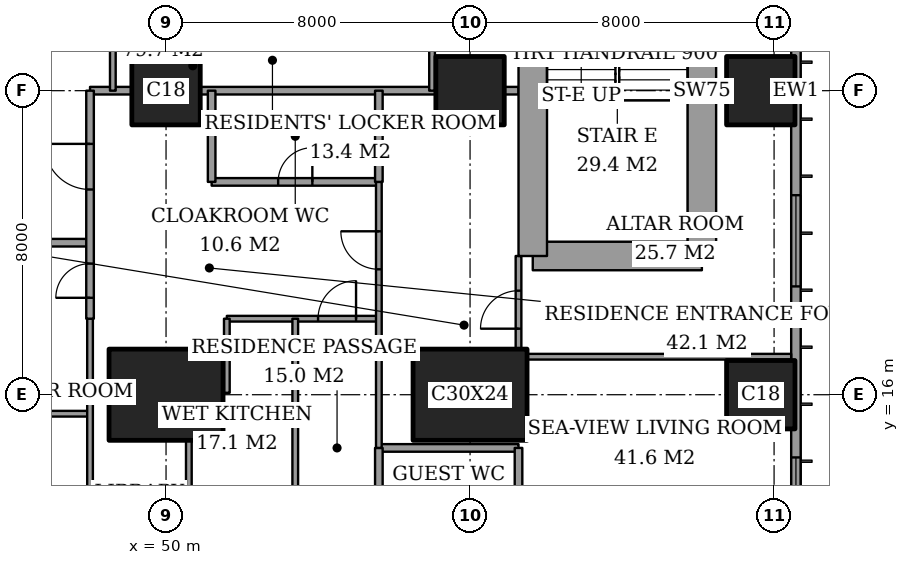
"""IFC4 building model, lengths in metres.
Left out: names, types, materials, properties, quantities, classifications, styles, units other than length and angle.
Written with IfcOpenShell. Run it as: python <this file> out.ifc"""

import sys

from ifc_helpers import new_model, si_unit, direction, frame, frame_2d, origin, origin_2d, place, context, subcontext, project, spatial, rectangle, extrude, element, fill, save


model = new_model("IFC4")
c1 = context("Model", 3, precision=1e-05, world=origin(), true_north=direction((0.0, 1.0)))
c2 = subcontext(c1, "Body", "Model", "MODEL_VIEW")
j1 = project(units=[si_unit("LENGTHUNIT", "METRE"), si_unit("PLANEANGLEUNIT", "RADIAN")], contexts=[c1])
p1 = place(None, origin())
s1 = spatial("IfcSite", under=j1, at=p1, CompositionType="ELEMENT")
p2 = place(p1, origin())
s2 = spatial("IfcBuilding", under=s1, at=p2, CompositionType="ELEMENT")
p3 = place(p2, frame((0.0, 0.0, 207.4)))
s3 = spatial("IfcBuildingStorey", under=s2, at=p3, CompositionType="ELEMENT", Elevation=207.4)
p4 = place(p3, frame((50.0, 16.0, 0.0), z_axis=(0.0, 0.0, 1.0), x_axis=(1.0, 0.0, 0.0)))
e1 = element("IfcColumn", 1, at=p4, inside=s3, PredefinedType="COLUMN", context=c2, shape_type="SweptSolid", body=[
    extrude(rectangle(XDim=3.0, YDim=2.4, at=origin_2d()), origin(), (0.0, 0.0, 1.0), 3.6),
])
p5 = place(p3, frame((50.0, 24.0, 0.0), z_axis=(0.0, 0.0, 1.0), x_axis=(1.0, 0.0, 0.0)))
e2 = element("IfcColumn", 2, at=p5, inside=s3, PredefinedType="COLUMN", context=c2, shape_type="SweptSolid", body=[
    extrude(rectangle(XDim=1.8, YDim=1.8, at=origin_2d()), origin(), (0.0, 0.0, 1.0), 3.6),
])
p6 = place(p3, frame((58.0, 16.0, 0.0), z_axis=(0.0, 0.0, 1.0), x_axis=(1.0, 0.0, 0.0)))
e3 = element("IfcColumn", 3, at=p6, inside=s3, PredefinedType="COLUMN", context=c2, shape_type="SweptSolid", body=[
    extrude(rectangle(XDim=3.0, YDim=2.4, at=origin_2d()), origin(), (0.0, 0.0, 1.0), 3.6),
])
for number, where, z_axis, x_axis in (
    (4, (58.0, 24.0, 0.0), (0.0, 0.0, 1.0), (1.0, 0.0, 0.0)),
    (5, (65.65, 16.0, 0.0), (0.0, 0.0, 1.0), (1.0, 0.0, 0.0)),
    (6, (65.65, 24.0, 0.0), (0.0, 0.0, 1.0), (1.0, 0.0, 0.0)),
):
    element("IfcColumn", number, at=place(p3, frame(where, z_axis=z_axis, x_axis=x_axis)), inside=s3, PredefinedType="COLUMN", context=c2, shape_type="SweptSolid", body=[
        extrude(rectangle(XDim=1.8, YDim=1.8, at=origin_2d()), origin(), (0.0, 0.0, 1.0), 3.6),
    ])
p7 = place(p3, frame((59.65, 19.65, 0.0), z_axis=(0.0, 0.0, 1.0), x_axis=(1.0, 0.0, 0.0)))
e7 = element("IfcWall", 7, at=p7, inside=s3, PredefinedType="SHEAR", context=c2, shape_type="SweptSolid", body=[
    extrude(rectangle(XDim=4.45, YDim=0.75, at=frame_2d((2.225, 0.0))), origin(), (0.0, 0.0, 1.0), 3.6),
])
p8 = place(p3, frame((64.1, 19.65, 0.0), z_axis=(0.0, 0.0, 1.0), x_axis=(0.0, 1.0, 0.0)))
e8 = element("IfcWall", 8, at=p8, inside=s3, PredefinedType="SHEAR", context=c2, shape_type="SweptSolid", body=[
    extrude(rectangle(XDim=8.7, YDim=0.75, at=frame_2d((4.35, 0.0))), origin(), (0.0, 0.0, 1.0), 3.6),
])
p9 = place(p3, frame((59.65, 28.35, 0.0), z_axis=(0.0, 0.0, 1.0), x_axis=(0.0, -1.0, 0.0)))
e9 = element("IfcWall", 9, at=p9, inside=s3, PredefinedType="SHEAR", context=c2, shape_type="SweptSolid", body=[
    extrude(rectangle(XDim=8.7, YDim=0.75, at=frame_2d((4.35, 0.0))), origin(), (0.0, 0.0, 1.0), 3.6),
])
p10 = place(p9, frame((0.975, 0.0, 0.0)))
e10 = element("IfcOpeningElement", 10, at=p10, cuts=e9, PredefinedType="OPENING", context=c2, shape_type="SweptSolid", body=[
    extrude(rectangle(XDim=1.0, YDim=2.1, at=frame_2d((0.5, 1.05))), frame((0.0, 0.385, 0.0), z_axis=(0.0, -1.0, 0.0), x_axis=(1.0, 0.0, 0.0)), (0.0, 0.0, 1.0), 0.77),
])
p11 = place(p3, frame((66.575, 3.175, 0.0), z_axis=(0.0, 0.0, 1.0), x_axis=(0.0, 1.0, 0.0)))
e11 = element("IfcWall", 11, at=p11, inside=s3, PredefinedType="SOLIDWALL", context=c2, shape_type="SweptSolid", body=[
    extrude(rectangle(XDim=41.65, YDim=0.25, at=frame_2d((20.825, 0.0))), origin(), (0.0, 0.0, 1.0), 3.6),
])
p12 = place(p11, frame((0.825, 0.0, 0.2)))
e12 = element("IfcOpeningElement", 12, at=p12, cuts=e11, PredefinedType="OPENING", context=c2, shape_type="SweptSolid", body=[
    extrude(rectangle(XDim=2.4, YDim=2.4, at=frame_2d((1.2, 1.2))), frame((0.0, 0.135, 0.0), z_axis=(0.0, -1.0, 0.0), x_axis=(1.0, 0.0, 0.0)), (0.0, 0.0, 1.0), 0.27),
])
p13 = place(p11, frame((6.6, 0.0, 0.2)))
e13 = element("IfcOpeningElement", 13, at=p13, cuts=e11, PredefinedType="OPENING", context=c2, shape_type="SweptSolid", body=[
    extrude(rectangle(XDim=1.2, YDim=2.4, at=frame_2d((0.6, 1.2))), frame((0.0, 0.135, 0.0), z_axis=(0.0, -1.0, 0.0), x_axis=(1.0, 0.0, 0.0)), (0.0, 0.0, 1.0), 0.27),
])
p14 = place(p11, frame((8.775, 0.0, 0.2)))
e14 = element("IfcOpeningElement", 14, at=p14, cuts=e11, PredefinedType="OPENING", context=c2, shape_type="SweptSolid", body=[
    extrude(rectangle(XDim=2.4, YDim=2.4, at=frame_2d((1.2, 1.2))), frame((0.0, 0.135, 0.0), z_axis=(0.0, -1.0, 0.0), x_axis=(1.0, 0.0, 0.0)), (0.0, 0.0, 1.0), 0.27),
])
p15 = place(p11, frame((15.675, 0.0, 0.2)))
e15 = element("IfcOpeningElement", 15, at=p15, cuts=e11, PredefinedType="OPENING", context=c2, shape_type="SweptSolid", body=[
    extrude(rectangle(XDim=2.4, YDim=2.4, at=frame_2d((1.2, 1.2))), frame((0.0, 0.135, 0.0), z_axis=(0.0, -1.0, 0.0), x_axis=(1.0, 0.0, 0.0)), (0.0, 0.0, 1.0), 0.27),
])
p16 = place(p11, frame((23.575, 0.0, 0.2)))
e16 = element("IfcOpeningElement", 16, at=p16, cuts=e11, PredefinedType="OPENING", context=c2, shape_type="SweptSolid", body=[
    extrude(rectangle(XDim=2.4, YDim=2.4, at=frame_2d((1.2, 1.2))), frame((0.0, 0.135, 0.0), z_axis=(0.0, -1.0, 0.0), x_axis=(1.0, 0.0, 0.0)), (0.0, 0.0, 1.0), 0.27),
])
p17 = place(p11, frame((30.675, 0.0, 0.2)))
e17 = element("IfcOpeningElement", 17, at=p17, cuts=e11, PredefinedType="OPENING", context=c2, shape_type="SweptSolid", body=[
    extrude(rectangle(XDim=2.4, YDim=2.4, at=frame_2d((1.2, 1.2))), frame((0.0, 0.135, 0.0), z_axis=(0.0, -1.0, 0.0), x_axis=(1.0, 0.0, 0.0)), (0.0, 0.0, 1.0), 0.27),
])
p18 = place(p11, frame((34.325, 0.0, 0.2)))
e18 = element("IfcOpeningElement", 18, at=p18, cuts=e11, PredefinedType="OPENING", context=c2, shape_type="SweptSolid", body=[
    extrude(rectangle(XDim=1.2, YDim=2.4, at=frame_2d((0.6, 1.2))), frame((0.0, 0.135, 0.0), z_axis=(0.0, -1.0, 0.0), x_axis=(1.0, 0.0, 0.0)), (0.0, 0.0, 1.0), 0.27),
])
p19 = place(p11, frame((38.425, 0.0, 0.2)))
e19 = element("IfcOpeningElement", 19, at=p19, cuts=e11, PredefinedType="OPENING", context=c2, shape_type="SweptSolid", body=[
    extrude(rectangle(XDim=2.4, YDim=2.4, at=frame_2d((1.2, 1.2))), frame((0.0, 0.135, 0.0), z_axis=(0.0, -1.0, 0.0), x_axis=(1.0, 0.0, 0.0)), (0.0, 0.0, 1.0), 0.27),
])
p20 = place(p3, frame((55.6, 14.6, 0.0), z_axis=(0.0, 0.0, 1.0), x_axis=(1.0, 0.0, 0.0)))
e20 = element("IfcWall", 20, at=p20, inside=s3, PredefinedType="PARTITIONING", context=c2, shape_type="SweptSolid", body=[
    extrude(rectangle(XDim=3.675, YDim=0.2, at=frame_2d((1.837, 0.0))), origin(), (0.0, 0.0, 1.0), 3.35),
])
p21 = place(p3, frame((42.0, 15.5, 0.0), z_axis=(0.0, 0.0, 1.0), x_axis=(1.0, 0.0, 0.0)))
e21 = element("IfcWall", 21, at=p21, inside=s3, PredefinedType="PARTITIONING", context=c2, shape_type="SweptSolid", body=[
    extrude(rectangle(XDim=6.0, YDim=0.15, at=frame_2d((3.0, 0.0))), origin(), (0.0, 0.0, 1.0), 3.35),
])
p22 = place(p3, frame((48.0, 16.05, 0.0), z_axis=(0.0, 0.0, 1.0), x_axis=(1.0, 0.0, 0.0)))
e22 = element("IfcWall", 22, at=p22, inside=s3, PredefinedType="PARTITIONING", context=c2, shape_type="SweptSolid", body=[
    extrude(rectangle(XDim=0.5, YDim=0.15, at=frame_2d((0.25, 0.0))), origin(), (0.0, 0.0, 1.0), 2.634),
])
p23 = place(p3, frame((59.5, 17.0, 0.0), z_axis=(0.0, 0.0, 1.0), x_axis=(1.0, 0.0, 0.0)))
e23 = element("IfcWall", 23, at=p23, inside=s3, PredefinedType="PARTITIONING", context=c2, shape_type="SweptSolid", body=[
    extrude(rectangle(XDim=6.95, YDim=0.15, at=frame_2d((3.475, 0.0))), origin(), (0.0, 0.0, 1.0), 3.35),
])
p24 = place(p3, frame((51.6, 18.0, 0.0), z_axis=(0.0, 0.0, 1.0), x_axis=(1.0, 0.0, 0.0)))
e24 = element("IfcWall", 24, at=p24, inside=s3, PredefinedType="PARTITIONING", context=c2, shape_type="SweptSolid", body=[
    extrude(rectangle(XDim=4.0, YDim=0.15, at=frame_2d((2.0, 0.0))), origin(), (0.0, 0.0, 1.0), 3.35),
])
p25 = place(p24, frame((2.4, 0.0, 0.0)))
e25 = element("IfcOpeningElement", 25, at=p25, cuts=e24, PredefinedType="OPENING", context=c2, shape_type="SweptSolid", body=[
    extrude(rectangle(XDim=1.0, YDim=2.1, at=frame_2d((0.5, 1.05))), frame((0.0, 0.085, 0.0), z_axis=(0.0, -1.0, 0.0), x_axis=(1.0, 0.0, 0.0)), (0.0, 0.0, 1.0), 0.17),
])
p26 = place(p3, frame((42.0, 20.0, 0.0), z_axis=(0.0, 0.0, 1.0), x_axis=(1.0, 0.0, 0.0)))
e26 = element("IfcWall", 26, at=p26, inside=s3, PredefinedType="PARTITIONING", context=c2, shape_type="SweptSolid", body=[
    extrude(rectangle(XDim=6.0, YDim=0.2, at=frame_2d((3.0, 0.0))), origin(), (0.0, 0.0, 1.0), 3.35),
])
p27 = place(p3, frame((51.2, 21.6, 0.0), z_axis=(0.0, 0.0, 1.0), x_axis=(1.0, 0.0, 0.0)))
e27 = element("IfcWall", 27, at=p27, inside=s3, PredefinedType="PARTITIONING", context=c2, shape_type="SweptSolid", body=[
    extrude(rectangle(XDim=4.4, YDim=0.2, at=frame_2d((2.2, 0.0))), origin(), (0.0, 0.0, 1.0), 3.35),
])
p28 = place(p27, frame((1.75, 0.0, 0.0)))
e28 = element("IfcOpeningElement", 28, at=p28, cuts=e27, PredefinedType="OPENING", context=c2, shape_type="SweptSolid", body=[
    extrude(rectangle(XDim=0.9, YDim=2.1, at=frame_2d((0.45, 1.05))), frame((0.0, 0.11, 0.0), z_axis=(0.0, -1.0, 0.0), x_axis=(1.0, 0.0, 0.0)), (0.0, 0.0, 1.0), 0.22),
])
p29 = place(p3, frame((48.0, 24.0, 0.0), z_axis=(0.0, 0.0, 1.0), x_axis=(1.0, 0.0, 0.0)))
e29 = element("IfcWall", 29, at=p29, inside=s3, PredefinedType="PARTITIONING", context=c2, shape_type="SweptSolid", body=[
    extrude(rectangle(XDim=1.1, YDim=0.2, at=frame_2d((0.55, 0.0))), origin(), (0.0, 0.0, 1.0), 3.35),
])
p30 = place(p3, frame((50.9, 24.0, 0.0), z_axis=(0.0, 0.0, 1.0), x_axis=(1.0, 0.0, 0.0)))
e30 = element("IfcWall", 30, at=p30, inside=s3, PredefinedType="PARTITIONING", context=c2, shape_type="SweptSolid", body=[
    extrude(rectangle(XDim=6.2, YDim=0.2, at=frame_2d((3.1, 0.0))), origin(), (0.0, 0.0, 1.0), 3.35),
])
p31 = place(p3, frame((58.9, 24.0, 0.0), z_axis=(0.0, 0.0, 1.0), x_axis=(1.0, 0.0, 0.0)))
e31 = element("IfcWall", 31, at=p31, inside=s3, PredefinedType="PARTITIONING", context=c2, shape_type="SweptSolid", body=[
    extrude(rectangle(XDim=0.375, YDim=0.2, at=frame_2d((0.188, 0.0))), origin(), (0.0, 0.0, 1.0), 3.35),
])
p32 = place(p3, frame((48.0, 18.0, 0.0), z_axis=(0.0, 0.0, 1.0), x_axis=(0.0, 1.0, 0.0)))
e32 = element("IfcWall", 32, at=p32, inside=s3, PredefinedType="PARTITIONING", context=c2, shape_type="SweptSolid", body=[
    extrude(rectangle(XDim=6.0, YDim=0.2, at=frame_2d((3.0, 0.0))), origin(), (0.0, 0.0, 1.0), 3.35),
])
p33 = place(p32, frame((3.4, 0.0, 0.0)))
e33 = element("IfcOpeningElement", 33, at=p33, cuts=e32, PredefinedType="OPENING", context=c2, shape_type="SweptSolid", body=[
    extrude(rectangle(XDim=1.2, YDim=2.4, at=frame_2d((0.6, 1.2))), frame((0.0, 0.11, 0.0), z_axis=(0.0, -1.0, 0.0), x_axis=(1.0, 0.0, 0.0)), (0.0, 0.0, 1.0), 0.22),
])
p34 = place(p32, frame((0.55, 0.0, 0.0)))
e34 = element("IfcOpeningElement", 34, at=p34, cuts=e32, PredefinedType="OPENING", context=c2, shape_type="SweptSolid", body=[
    extrude(rectangle(XDim=0.9, YDim=2.1, at=frame_2d((0.45, 1.05))), frame((0.0, 0.11, 0.0), z_axis=(0.0, -1.0, 0.0), x_axis=(1.0, 0.0, 0.0)), (0.0, 0.0, 1.0), 0.22),
])
p35 = place(p3, frame((48.0, 11.2, 0.0), z_axis=(0.0, 0.0, 1.0), x_axis=(0.0, 1.0, 0.0)))
e35 = element("IfcWall", 35, at=p35, inside=s3, PredefinedType="PARTITIONING", context=c2, shape_type="SweptSolid", body=[
    extrude(rectangle(XDim=6.8, YDim=0.15, at=frame_2d((3.4, 0.0))), origin(), (0.0, 0.0, 1.0), 3.35),
])
p36 = place(p3, frame((48.6, 24.0, 0.0), z_axis=(0.0, 0.0, 1.0), x_axis=(0.0, 1.0, 0.0)))
e36 = element("IfcWall", 36, at=p36, inside=s3, PredefinedType="PARTITIONING", context=c2, shape_type="SweptSolid", body=[
    extrude(rectangle(XDim=1.6, YDim=0.15, at=frame_2d((0.8, 0.0))), origin(), (0.0, 0.0, 1.0), 3.35),
])
p37 = place(p3, frame((50.6, 11.2, 0.0), z_axis=(0.0, 0.0, 1.0), x_axis=(0.0, 1.0, 0.0)))
e37 = element("IfcWall", 37, at=p37, inside=s3, PredefinedType="PARTITIONING", context=c2, shape_type="SweptSolid", body=[
    extrude(rectangle(XDim=3.6, YDim=0.15, at=frame_2d((1.8, 0.0))), origin(), (0.0, 0.0, 1.0), 3.35),
])
p38 = place(p3, frame((51.2, 21.6, 0.0), z_axis=(0.0, 0.0, 1.0), x_axis=(0.0, 1.0, 0.0)))
e38 = element("IfcWall", 38, at=p38, inside=s3, PredefinedType="PARTITIONING", context=c2, shape_type="SweptSolid", body=[
    extrude(rectangle(XDim=2.4, YDim=0.2, at=frame_2d((1.2, 0.0))), origin(), (0.0, 0.0, 1.0), 3.35),
])
p39 = place(p3, frame((51.6, 16.05, 0.0), z_axis=(0.0, 0.0, 1.0), x_axis=(0.0, 1.0, 0.0)))
e39 = element("IfcWall", 39, at=p39, inside=s3, PredefinedType="PARTITIONING", context=c2, shape_type="SweptSolid", body=[
    extrude(rectangle(XDim=1.95, YDim=0.15, at=frame_2d((0.975, 0.0))), origin(), (0.0, 0.0, 1.0), 3.35),
])
p40 = place(p3, frame((53.4, 11.2, 0.0), z_axis=(0.0, 0.0, 1.0), x_axis=(0.0, 1.0, 0.0)))
e40 = element("IfcWall", 40, at=p40, inside=s3, PredefinedType="PARTITIONING", context=c2, shape_type="SweptSolid", body=[
    extrude(rectangle(XDim=6.8, YDim=0.15, at=frame_2d((3.4, 0.0))), origin(), (0.0, 0.0, 1.0), 3.35),
])
p41 = place(p3, frame((55.6, 11.2, 0.0), z_axis=(0.0, 0.0, 1.0), x_axis=(0.0, 1.0, 0.0)))
e41 = element("IfcWall", 41, at=p41, inside=s3, PredefinedType="PARTITIONING", context=c2, shape_type="SweptSolid", body=[
    extrude(rectangle(XDim=3.4, YDim=0.2, at=frame_2d((1.7, 0.0))), origin(), (0.0, 0.0, 1.0), 3.35),
])
p42 = place(p3, frame((55.6, 21.6, 0.0), z_axis=(0.0, 0.0, 1.0), x_axis=(0.0, 1.0, 0.0)))
e42 = element("IfcWall", 42, at=p42, inside=s3, PredefinedType="PARTITIONING", context=c2, shape_type="SweptSolid", body=[
    extrude(rectangle(XDim=2.4, YDim=0.2, at=frame_2d((1.2, 0.0))), origin(), (0.0, 0.0, 1.0), 3.35),
])
p43 = place(p3, frame((55.6, 14.6, 0.0), z_axis=(0.0, 0.0, 1.0), x_axis=(0.0, 1.0, 0.0)))
e43 = element("IfcWall", 43, at=p43, inside=s3, PredefinedType="PARTITIONING", context=c2, shape_type="SweptSolid", body=[
    extrude(rectangle(XDim=7.0, YDim=0.15, at=frame_2d((3.5, 0.0))), origin(), (0.0, 0.0, 1.0), 3.35),
])
p44 = place(p43, frame((4.7, 0.0, 0.0)))
e44 = element("IfcOpeningElement", 44, at=p44, cuts=e43, PredefinedType="OPENING", context=c2, shape_type="SweptSolid", body=[
    extrude(rectangle(XDim=1.0, YDim=2.1, at=frame_2d((0.5, 1.05))), frame((0.0, 0.085, 0.0), z_axis=(0.0, -1.0, 0.0), x_axis=(1.0, 0.0, 0.0)), (0.0, 0.0, 1.0), 0.17),
])
p45 = place(p3, frame((57.0, 24.0, 0.0), z_axis=(0.0, 0.0, 1.0), x_axis=(0.0, 1.0, 0.0)))
e45 = element("IfcWall", 45, at=p45, inside=s3, PredefinedType="PARTITIONING", context=c2, shape_type="SweptSolid", body=[
    extrude(rectangle(XDim=1.6, YDim=0.15, at=frame_2d((0.8, 0.0))), origin(), (0.0, 0.0, 1.0), 3.35),
])
p46 = place(p3, frame((59.275, 11.2, 0.0), z_axis=(0.0, 0.0, 1.0), x_axis=(0.0, 1.0, 0.0)))
e46 = element("IfcWall", 46, at=p46, inside=s3, PredefinedType="PARTITIONING", context=c2, shape_type="SweptSolid", body=[
    extrude(rectangle(XDim=3.4, YDim=0.2, at=frame_2d((1.7, 0.0))), origin(), (0.0, 0.0, 1.0), 3.35),
])
p47 = place(p3, frame((59.275, 17.2, 0.0), z_axis=(0.0, 0.0, 1.0), x_axis=(0.0, 1.0, 0.0)))
e47 = element("IfcWall", 47, at=p47, inside=s3, PredefinedType="PARTITIONING", context=c2, shape_type="SweptSolid", body=[
    extrude(rectangle(XDim=2.45, YDim=0.15, at=frame_2d((1.225, 0.0))), origin(), (0.0, 0.0, 1.0), 3.35),
])
p48 = place(p47, frame((0.538, 0.0, 0.0)))
e48 = element("IfcOpeningElement", 48, at=p48, cuts=e47, PredefinedType="OPENING", context=c2, shape_type="SweptSolid", body=[
    extrude(rectangle(XDim=1.0, YDim=2.1, at=frame_2d((0.5, 1.05))), frame((0.0, 0.085, 0.0), z_axis=(0.0, -1.0, 0.0), x_axis=(1.0, 0.0, 0.0)), (0.0, 0.0, 1.0), 0.17),
])
p49 = place(p14, origin())
e49 = element("IfcWindow", 49, at=p49, inside=s3, PartitioningType="SINGLE_PANEL", PredefinedType="WINDOW", context=c2, shape_type="SweptSolid", body=[
    extrude(rectangle(XDim=2.4, YDim=2.4, at=frame_2d((1.2, 1.2))), frame((0.0, 0.03, 0.0), z_axis=(0.0, -1.0, 0.0), x_axis=(1.0, 0.0, 0.0)), (0.0, 0.0, 1.0), 0.06),
])
fill(e14, e49)
p50 = place(p15, origin())
e50 = element("IfcWindow", 50, at=p50, inside=s3, PartitioningType="SINGLE_PANEL", PredefinedType="WINDOW", context=c2, shape_type="SweptSolid", body=[
    extrude(rectangle(XDim=2.4, YDim=2.4, at=frame_2d((1.2, 1.2))), frame((0.0, 0.03, 0.0), z_axis=(0.0, -1.0, 0.0), x_axis=(1.0, 0.0, 0.0)), (0.0, 0.0, 1.0), 0.06),
])
fill(e15, e50)
p51 = place(p48, origin())
e51 = element("IfcDoor", 51, at=p51, inside=s3, OperationType="SINGLE_SWING_RIGHT", PredefinedType="DOOR", context=c2, shape_type="SweptSolid", body=[
    extrude(rectangle(XDim=1.0, YDim=2.1, at=frame_2d((0.5, 1.05))), frame((0.0, 0.025, 0.0), z_axis=(0.0, -1.0, 0.0), x_axis=(1.0, 0.0, 0.0)), (0.0, 0.0, 1.0), 0.05),
])
fill(e48, e51)
p52 = place(p44, origin())
e52 = element("IfcDoor", 52, at=p52, inside=s3, OperationType="SINGLE_SWING_LEFT", PredefinedType="DOOR", context=c2, shape_type="SweptSolid", body=[
    extrude(rectangle(XDim=1.0, YDim=2.1, at=frame_2d((0.5, 1.05))), frame((0.0, 0.025, 0.0), z_axis=(0.0, -1.0, 0.0), x_axis=(1.0, 0.0, 0.0)), (0.0, 0.0, 1.0), 0.05),
])
fill(e44, e52)
p53 = place(p28, origin())
e53 = element("IfcDoor", 53, at=p53, inside=s3, OperationType="SINGLE_SWING_LEFT", PredefinedType="DOOR", context=c2, shape_type="SweptSolid", body=[
    extrude(rectangle(XDim=0.9, YDim=2.1, at=frame_2d((0.45, 1.05))), frame((0.0, 0.025, 0.0), z_axis=(0.0, -1.0, 0.0), x_axis=(1.0, 0.0, 0.0)), (0.0, 0.0, 1.0), 0.05),
])
fill(e28, e53)
p54 = place(p33, origin())
e54 = element("IfcDoor", 54, at=p54, inside=s3, OperationType="SINGLE_SWING_LEFT", PredefinedType="DOOR", context=c2, shape_type="SweptSolid", body=[
    extrude(rectangle(XDim=1.2, YDim=2.4, at=frame_2d((0.6, 1.2))), frame((0.0, 0.025, 0.0), z_axis=(0.0, -1.0, 0.0), x_axis=(1.0, 0.0, 0.0)), (0.0, 0.0, 1.0), 0.05),
])
fill(e33, e54)
p55 = place(p25, origin())
e55 = element("IfcDoor", 55, at=p55, inside=s3, OperationType="SINGLE_SWING_LEFT", PredefinedType="DOOR", context=c2, shape_type="SweptSolid", body=[
    extrude(rectangle(XDim=1.0, YDim=2.1, at=frame_2d((0.5, 1.05))), frame((0.0, 0.025, 0.0), z_axis=(0.0, -1.0, 0.0), x_axis=(1.0, 0.0, 0.0)), (0.0, 0.0, 1.0), 0.05),
])
fill(e25, e55)
p56 = place(p34, origin())
e56 = element("IfcDoor", 56, at=p56, inside=s3, OperationType="SINGLE_SWING_RIGHT", PredefinedType="DOOR", context=c2, shape_type="SweptSolid", body=[
    extrude(rectangle(XDim=0.9, YDim=2.1, at=frame_2d((0.45, 1.05))), frame((0.0, 0.025, 0.0), z_axis=(0.0, -1.0, 0.0), x_axis=(1.0, 0.0, 0.0)), (0.0, 0.0, 1.0), 0.05),
])
fill(e34, e56)
save(model, sys.argv[1])
